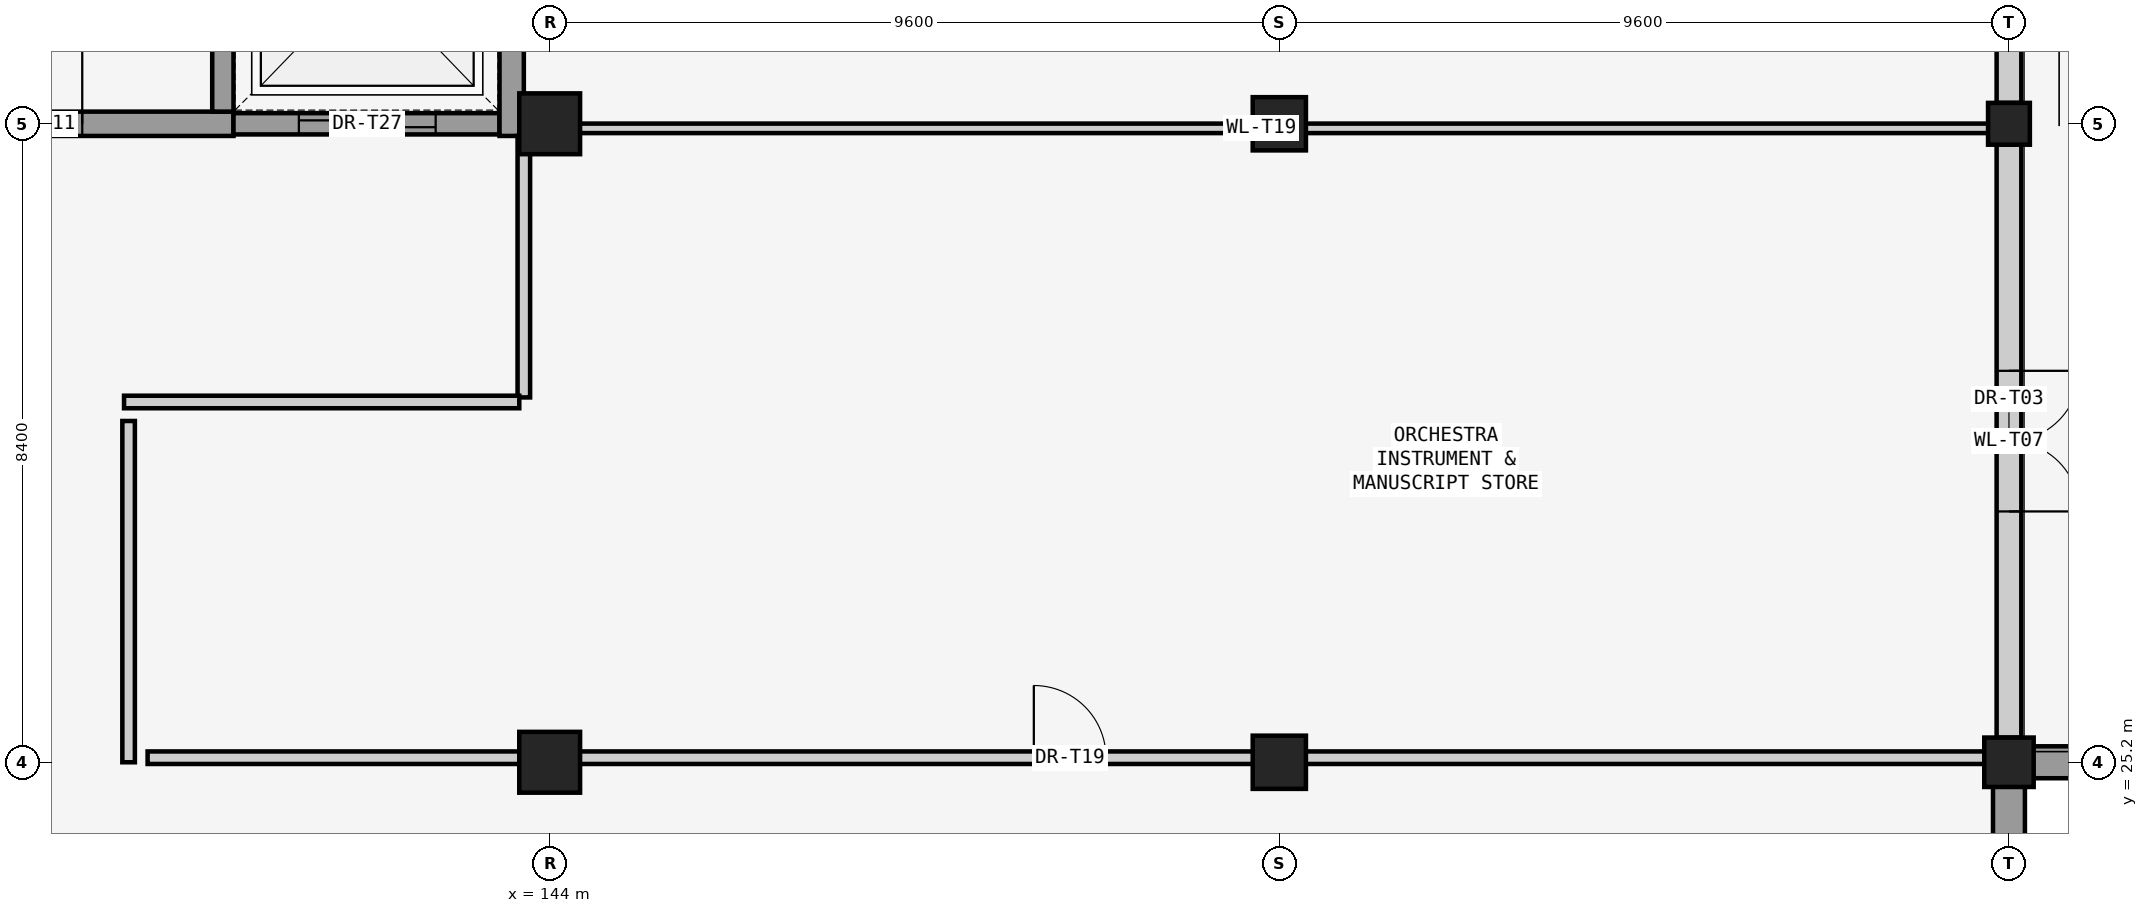
"""IFC4 building model, lengths in metres.
Left out: names, types, materials, properties, quantities, classifications, styles, units other than length and angle.
Written with IfcOpenShell. Run it as: python <this file> out.ifc"""

import sys

from ifc_helpers import new_model, si_unit, direction, frame, frame_2d, origin, origin_2d, place, context, subcontext, project, spatial, rectangle, extrude, element, fill, save


model = new_model("IFC4")
c1 = context("Model", 3, precision=1e-05, world=origin(), true_north=direction((0.0, 1.0)))
c2 = subcontext(c1, "Body", "Model", "MODEL_VIEW")
j1 = project(units=[si_unit("LENGTHUNIT", "METRE"), si_unit("PLANEANGLEUNIT", "RADIAN")], contexts=[c1])
p1 = place(None, origin())
s1 = spatial("IfcSite", under=j1, at=p1, CompositionType="ELEMENT")
p2 = place(p1, origin())
s2 = spatial("IfcBuilding", under=s1, at=p2, CompositionType="ELEMENT")
p3 = place(p2, frame((0.0, 0.0, -4.8)))
s3 = spatial("IfcBuildingStorey", under=s2, at=p3, CompositionType="ELEMENT", Elevation=-4.8)
for number, where, z_axis, x_axis in (
    (1, (144.0, 25.2, 0.0), (0.0, 0.0, 1.0), (1.0, 0.0, 0.0)),
    (2, (144.0, 33.6, 0.0), (0.0, 0.0, 1.0), (1.0, 0.0, 0.0)),
):
    element("IfcColumn", number, at=place(p3, frame(where, z_axis=z_axis, x_axis=x_axis)), inside=s3, PredefinedType="COLUMN", context=c2, shape_type="SweptSolid", body=[
        extrude(rectangle(XDim=0.8, YDim=0.8, at=origin_2d()), origin(), (0.0, 0.0, 1.0), 4.38),
    ])
for number, where, z_axis, x_axis in (
    (3, (153.6, 25.2, 0.0), (0.0, 0.0, 1.0), (1.0, 0.0, 0.0)),
    (4, (153.6, 33.6, 0.0), (0.0, 0.0, 1.0), (1.0, 0.0, 0.0)),
):
    element("IfcColumn", number, at=place(p3, frame(where, z_axis=z_axis, x_axis=x_axis)), inside=s3, PredefinedType="COLUMN", context=c2, shape_type="SweptSolid", body=[
        extrude(rectangle(XDim=0.7, YDim=0.7, at=origin_2d()), origin(), (0.0, 0.0, 1.0), 4.38),
    ])
p4 = place(p3, frame((163.2, 25.2, 0.0), z_axis=(0.0, 0.0, 1.0), x_axis=(1.0, 0.0, 0.0)))
e5 = element("IfcColumn", 5, at=p4, inside=s3, PredefinedType="COLUMN", context=c2, shape_type="SweptSolid", body=[
    extrude(rectangle(XDim=0.65, YDim=0.65, at=origin_2d()), origin(), (0.0, 0.0, 1.0), 4.57),
])
p5 = place(p3, frame((163.2, 33.6, 0.0), z_axis=(0.0, 0.0, 1.0), x_axis=(1.0, 0.0, 0.0)))
e6 = element("IfcColumn", 6, at=p5, inside=s3, PredefinedType="COLUMN", context=c2, shape_type="SweptSolid", body=[
    extrude(rectangle(XDim=0.55, YDim=0.55, at=origin_2d()), origin(), (0.0, 0.0, 1.0), 4.57),
])
p6 = place(p3, frame((163.2, 25.2, 0.0), z_axis=(0.0, 0.0, 1.0), x_axis=(0.0, -1.0, 0.0)))
e7 = element("IfcWall", 7, at=p6, inside=s3, PredefinedType="USERDEFINED", context=c2, shape_type="SweptSolid", body=[
    extrude(rectangle(XDim=8.4, YDim=0.42, at=frame_2d((4.2, 0.0))), origin(), (0.0, 0.0, 1.0), 4.55),
])
p7 = place(p3, frame((172.8, 25.2, 0.0), z_axis=(0.0, 0.0, 1.0), x_axis=(-1.0, 0.0, 0.0)))
e8 = element("IfcWall", 8, at=p7, inside=s3, PredefinedType="USERDEFINED", context=c2, shape_type="SweptSolid", body=[
    extrude(rectangle(XDim=9.6, YDim=0.42, at=frame_2d((4.8, 0.0))), origin(), (0.0, 0.0, 1.0), 4.55),
])
p8 = place(p3, frame((163.2, 33.325, 0.0), z_axis=(0.0, 0.0, 1.0), x_axis=(0.0, -1.0, 0.0)))
e9 = element("IfcWall", 9, at=p8, inside=s3, PredefinedType="SOLIDWALL", context=c2, shape_type="SweptSolid", body=[
    extrude(rectangle(XDim=7.8, YDim=0.325, at=frame_2d((3.9, 0.0))), origin(), (0.0, 0.0, 1.0), 3.75),
])
p9 = place(p8, frame((2.975, 0.0, 0.0)))
e10 = element("IfcOpeningElement", 10, at=p9, cuts=e9, PredefinedType="OPENING", context=c2, shape_type="SweptSolid", body=[
    extrude(rectangle(XDim=1.85, YDim=2.3, at=frame_2d((0.925, 1.15))), frame((0.0, 0.172, 0.0), z_axis=(0.0, -1.0, 0.0), x_axis=(1.0, 0.0, 0.0)), (0.0, 0.0, 1.0), 0.345),
])
p10 = place(p3, frame((163.2, 41.7, 0.0), z_axis=(0.0, 0.0, 1.0), x_axis=(0.0, -1.0, 0.0)))
e11 = element("IfcWall", 11, at=p10, inside=s3, PredefinedType="SOLIDWALL", context=c2, shape_type="SweptSolid", body=[
    extrude(rectangle(XDim=7.825, YDim=0.325, at=frame_2d((3.913, 0.0))), origin(), (0.0, 0.0, 1.0), 3.9),
])
p11 = place(p10, frame((2.987, 0.0, 0.0)))
e12 = element("IfcOpeningElement", 12, at=p11, cuts=e11, PredefinedType="OPENING", context=c2, shape_type="SweptSolid", body=[
    extrude(rectangle(XDim=1.85, YDim=2.3, at=frame_2d((0.925, 1.15))), frame((0.0, 0.172, 0.0), z_axis=(0.0, -1.0, 0.0), x_axis=(1.0, 0.0, 0.0)), (0.0, 0.0, 1.0), 0.345),
])
p12 = place(p3, frame((135.06, 33.6, 0.0), z_axis=(0.0, 0.0, 1.0), x_axis=(1.0, 0.0, 0.0)))
e13 = element("IfcWall", 13, at=p12, inside=s3, PredefinedType="SHEAR", context=c2, shape_type="SweptSolid", body=[
    extrude(rectangle(XDim=4.78, YDim=0.32, at=frame_2d((2.39, 0.0))), origin(), (0.0, 0.0, 1.0), 4.36),
])
p13 = place(p12, frame((1.69, 0.0, 0.0)))
e14 = element("IfcOpeningElement", 14, at=p13, cuts=e13, PredefinedType="OPENING", context=c2, shape_type="SweptSolid", body=[
    extrude(rectangle(XDim=1.1, YDim=2.2, at=frame_2d((0.55, 1.1))), frame((0.0, 0.17, 0.0), z_axis=(0.0, -1.0, 0.0), x_axis=(1.0, 0.0, 0.0)), (0.0, 0.0, 1.0), 0.34),
])
p14 = place(p3, frame((139.84, 33.6, 0.0), z_axis=(0.0, 0.0, 1.0), x_axis=(1.0, 0.0, 0.0)))
e15 = element("IfcWall", 15, at=p14, inside=s3, PredefinedType="SHEAR", context=c2, shape_type="SweptSolid", body=[
    extrude(rectangle(XDim=3.5, YDim=0.28, at=frame_2d((1.75, 0.0))), origin(), (0.0, 0.0, 1.0), 4.36),
])
p15 = place(p14, frame((0.86, 0.0, 0.0)))
e16 = element("IfcOpeningElement", 16, at=p15, cuts=e15, PredefinedType="OPENING", context=c2, shape_type="SweptSolid", body=[
    extrude(rectangle(XDim=1.8, YDim=2.4, at=frame_2d((0.9, 1.2))), frame((0.0, 0.15, 0.0), z_axis=(0.0, -1.0, 0.0), x_axis=(1.0, 0.0, 0.0)), (0.0, 0.0, 1.0), 0.3),
])
p16 = place(p3, frame((143.5, 33.44, 0.0), z_axis=(0.0, 0.0, 1.0), x_axis=(0.0, 1.0, 0.0)))
e17 = element("IfcWall", 17, at=p16, inside=s3, PredefinedType="SHEAR", context=c2, shape_type="SweptSolid", body=[
    extrude(rectangle(XDim=8.36, YDim=0.32, at=frame_2d((4.18, 0.0))), origin(), (0.0, 0.0, 1.0), 4.36),
])
p17 = place(p3, frame((139.7, 33.76, 0.0), z_axis=(0.0, 0.0, 1.0), x_axis=(0.0, 1.0, 0.0)))
e18 = element("IfcWall", 18, at=p17, inside=s3, PredefinedType="SHEAR", context=c2, shape_type="SweptSolid", body=[
    extrude(rectangle(XDim=7.72, YDim=0.28, at=frame_2d((3.86, 0.0))), origin(), (0.0, 0.0, 1.0), 4.36),
])
p18 = place(p3, frame((143.66, 30.0, 0.0), z_axis=(0.0, 0.0, 1.0), x_axis=(0.0, 1.0, 0.0)))
e19 = element("IfcWall", 19, at=p18, inside=s3, PredefinedType="PARTITIONING", context=c2, shape_type="SweptSolid", body=[
    extrude(rectangle(XDim=3.44, YDim=0.165, at=frame_2d((1.72, 0.0))), origin(), (0.0, 0.0, 1.0), 4.33),
])
p19 = place(p3, frame((138.4, 29.94, 0.0), z_axis=(0.0, 0.0, 1.0), x_axis=(1.0, 0.0, 0.0)))
e20 = element("IfcWall", 20, at=p19, inside=s3, PredefinedType="PARTITIONING", context=c2, shape_type="SweptSolid", body=[
    extrude(rectangle(XDim=5.2, YDim=0.165, at=frame_2d((2.6, 0.0))), origin(), (0.0, 0.0, 1.0), 4.33),
])
p20 = place(p3, frame((138.46, 25.2, 0.0), z_axis=(0.0, 0.0, 1.0), x_axis=(0.0, 1.0, 0.0)))
e21 = element("IfcWall", 21, at=p20, inside=s3, PredefinedType="PARTITIONING", context=c2, shape_type="SweptSolid", body=[
    extrude(rectangle(XDim=4.49, YDim=0.165, at=frame_2d((2.245, 0.0))), origin(), (0.0, 0.0, 1.0), 4.33),
])
p21 = place(p3, frame((138.71, 25.26, 0.0), z_axis=(0.0, 0.0, 1.0), x_axis=(1.0, 0.0, 0.0)))
e22 = element("IfcWall", 22, at=p21, inside=s3, PredefinedType="PARTITIONING", context=c2, shape_type="SweptSolid", body=[
    extrude(rectangle(XDim=24.27, YDim=0.165, at=frame_2d((12.135, 0.0))), origin(), (0.0, 0.0, 1.0), 3.36),
])
p22 = place(p21, frame((11.66, 0.0, 0.0)))
e23 = element("IfcOpeningElement", 23, at=p22, cuts=e22, PredefinedType="OPENING", context=c2, shape_type="SweptSolid", body=[
    extrude(rectangle(XDim=0.95, YDim=2.15, at=frame_2d((0.475, 1.075))), frame((0.0, 0.093, 0.0), z_axis=(0.0, -1.0, 0.0), x_axis=(1.0, 0.0, 0.0)), (0.0, 0.0, 1.0), 0.185),
])
p23 = place(p3, frame((143.75, 33.54, 0.0), z_axis=(0.0, 0.0, 1.0), x_axis=(1.0, 0.0, 0.0)))
e24 = element("IfcWall", 24, at=p23, inside=s3, PredefinedType="PARTITIONING", context=c2, shape_type="SweptSolid", body=[
    extrude(rectangle(XDim=19.23, YDim=0.125, at=frame_2d((9.615, 0.0))), origin(), (0.0, 0.0, 1.0), 3.26),
])
p24 = place(p9, origin())
e25 = element("IfcDoor", 25, at=p24, inside=s3, OperationType="DOUBLE_DOOR_SINGLE_SWING", PredefinedType="DOOR", context=c2, shape_type="SweptSolid", body=[
    extrude(rectangle(XDim=1.85, YDim=2.3, at=frame_2d((0.925, 1.15))), frame((0.0, 0.025, 0.0), z_axis=(0.0, -1.0, 0.0), x_axis=(1.0, 0.0, 0.0)), (0.0, 0.0, 1.0), 0.05),
])
fill(e10, e25)
p25 = place(p13, origin())
e26 = element("IfcDoor", 26, at=p25, inside=s3, OperationType="SINGLE_SWING_RIGHT", PredefinedType="DOOR", context=c2, shape_type="SweptSolid", body=[
    extrude(rectangle(XDim=1.1, YDim=2.2, at=frame_2d((0.55, 1.1))), frame((0.0, 0.025, 0.0), z_axis=(0.0, -1.0, 0.0), x_axis=(1.0, 0.0, 0.0)), (0.0, 0.0, 1.0), 0.05),
])
fill(e14, e26)
p26 = place(p15, origin())
e27 = element("IfcDoor", 27, at=p26, inside=s3, OperationType="SLIDING_TO_LEFT", PredefinedType="DOOR", context=c2, shape_type="SweptSolid", body=[
    extrude(rectangle(XDim=1.8, YDim=2.4, at=frame_2d((0.9, 1.2))), frame((0.0, 0.025, 0.0), z_axis=(0.0, -1.0, 0.0), x_axis=(1.0, 0.0, 0.0)), (0.0, 0.0, 1.0), 0.05),
])
fill(e16, e27)
p27 = place(p22, origin())
e28 = element("IfcDoor", 28, at=p27, inside=s3, OperationType="SINGLE_SWING_LEFT", PredefinedType="DOOR", context=c2, shape_type="SweptSolid", body=[
    extrude(rectangle(XDim=0.95, YDim=2.15, at=frame_2d((0.475, 1.075))), frame((0.0, 0.025, 0.0), z_axis=(0.0, -1.0, 0.0), x_axis=(1.0, 0.0, 0.0)), (0.0, 0.0, 1.0), 0.05),
])
fill(e23, e28)
save(model, sys.argv[1])
